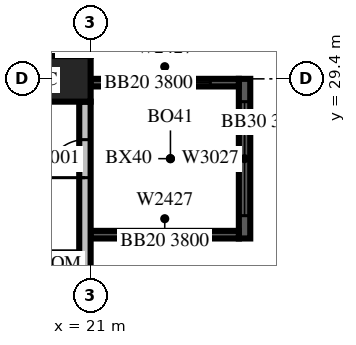
"""IFC4 building model, lengths in metres.
Left out: names, types, materials, properties, quantities, classifications, styles, units other than length and angle.
Written with IfcOpenShell. Run it as: python <this file> out.ifc"""

import sys

from ifc_helpers import new_model, si_unit, direction, frame, frame_2d, origin, origin_2d, place, context, subcontext, project, spatial, rectangle, extrude, source, transform, mapped, element, fill, save


model = new_model("IFC4")
c1 = context("Model", 3, precision=1e-05, world=origin(), true_north=direction((0.0, 1.0)))
c2 = subcontext(c1, "Body", "Model", "MODEL_VIEW")
j1 = project(units=[si_unit("LENGTHUNIT", "METRE"), si_unit("PLANEANGLEUNIT", "RADIAN")], contexts=[c1])
p1 = place(None, origin())
s1 = spatial("IfcSite", under=j1, at=p1, CompositionType="ELEMENT")
p2 = place(p1, origin())
s2 = spatial("IfcBuilding", under=s1, at=p2, CompositionType="ELEMENT")
p3 = place(p2, frame((0.0, 0.0, 65.7)))
s3 = spatial("IfcBuildingStorey", under=s2, at=p3, CompositionType="ELEMENT", Elevation=65.7)
m1 = source(origin(), c2, "Body", "SweptSolid", [
    extrude(rectangle(XDim=1.2, YDim=1.2, at=origin_2d()), origin(), (0.0, 0.0, 1.0), 4.2),
])
p4 = place(p3, frame((20.4, 29.4, 0.0), z_axis=(0.0, 0.0, 1.0), x_axis=(1.0, 0.0, 0.0)))
e1 = element("IfcColumn", 1, at=p4, inside=s3, PredefinedType="COLUMN", context=c2, shape_type="MappedRepresentation", body=[
    mapped(m1, transform((0.0, 0.0, 0.0), scale=1.0)),
])
m2 = source(origin(), c2, "Body", "SweptSolid", [
    extrude(rectangle(XDim=4.2, YDim=0.3, at=frame_2d((2.1, 0.0))), origin(), (0.0, 0.0, 1.0), 3.8),
])
p5 = place(p3, frame((25.05, 25.2, 0.0), z_axis=(0.0, 0.0, 1.0), x_axis=(0.0, 1.0, 0.0)))
e2 = element("IfcWall", 2, at=p5, inside=s3, PredefinedType="SOLIDWALL", context=c2, shape_type="MappedRepresentation", body=[
    mapped(m2, transform((0.0, 0.0, 0.0), scale=1.0)),
])
m3 = source(origin(), c2, "Body", "SweptSolid", [
    extrude(rectangle(XDim=3.0, YDim=2.7, at=frame_2d((1.5, 1.35))), frame((0.0, 0.16, 0.0), z_axis=(0.0, -1.0, 0.0), x_axis=(1.0, 0.0, 0.0)), (0.0, 0.0, 1.0), 0.32),
])
p6 = place(p5, frame((0.6, 0.0, 0.6)))
e3 = element("IfcOpeningElement", 3, at=p6, cuts=e2, PredefinedType="OPENING", context=c2, shape_type="MappedRepresentation", body=[
    mapped(m3, transform((0.0, 0.0, 0.0), scale=1.0)),
])
m4 = source(origin(), c2, "Body", "SweptSolid", [
    extrude(rectangle(XDim=3.9, YDim=0.2, at=frame_2d((1.95, 0.0))), origin(), (0.0, 0.0, 1.0), 3.8),
])
p7 = place(p3, frame((21.0, 25.3, 0.0), z_axis=(0.0, 0.0, 1.0), x_axis=(1.0, 0.0, 0.0)))
e4 = element("IfcWall", 4, at=p7, inside=s3, PredefinedType="SOLIDWALL", context=c2, shape_type="MappedRepresentation", body=[
    mapped(m4, transform((0.0, 0.0, 0.0), scale=1.0)),
])
m5 = source(origin(), c2, "Body", "SweptSolid", [
    extrude(rectangle(XDim=2.4, YDim=2.7, at=frame_2d((1.2, 1.35))), frame((0.0, 0.11, 0.0), z_axis=(0.0, -1.0, 0.0), x_axis=(1.0, 0.0, 0.0)), (0.0, 0.0, 1.0), 0.22),
])
p8 = place(p7, frame((0.75, 0.0, 0.6)))
e5 = element("IfcOpeningElement", 5, at=p8, cuts=e4, PredefinedType="OPENING", context=c2, shape_type="MappedRepresentation", body=[
    mapped(m5, transform((0.0, 0.0, 0.0), scale=1.0)),
])
p9 = place(p3, frame((21.0, 29.3, 0.0), z_axis=(0.0, 0.0, 1.0), x_axis=(1.0, 0.0, 0.0)))
e6 = element("IfcWall", 6, at=p9, inside=s3, PredefinedType="SOLIDWALL", context=c2, shape_type="MappedRepresentation", body=[
    mapped(m4, transform((0.0, 0.0, 0.0), scale=1.0)),
])
p10 = place(p9, frame((0.75, 0.0, 0.6)))
e7 = element("IfcOpeningElement", 7, at=p10, cuts=e6, PredefinedType="OPENING", context=c2, shape_type="MappedRepresentation", body=[
    mapped(m5, transform((0.0, 0.0, 0.0), scale=1.0)),
])
m6 = source(origin(), c2, "Body", "SweptSolid", [
    extrude(rectangle(XDim=6.6, YDim=0.3, at=frame_2d((3.3, 0.0))), origin(), (0.0, 0.0, 1.0), 3.8),
])
p11 = place(p3, frame((20.85, 22.2, 0.0), z_axis=(0.0, 0.0, 1.0), x_axis=(0.0, 1.0, 0.0)))
e8 = element("IfcWall", 8, at=p11, inside=s3, PredefinedType="STANDARD", context=c2, shape_type="MappedRepresentation", body=[
    mapped(m6, transform((0.0, 0.0, 0.0), scale=1.0)),
])
m7 = source(origin(), c2, "Body", "SweptSolid", [
    extrude(rectangle(XDim=1.2, YDim=2.7, at=frame_2d((0.6, 1.35))), frame((0.0, 0.16, 0.0), z_axis=(0.0, -1.0, 0.0), x_axis=(1.0, 0.0, 0.0)), (0.0, 0.0, 1.0), 0.32),
])
p12 = place(p11, frame((0.3, 0.0, 0.6)))
e9 = element("IfcOpeningElement", 9, at=p12, cuts=e8, PredefinedType="OPENING", context=c2, shape_type="MappedRepresentation", body=[
    mapped(m7, transform((0.0, 0.0, 0.0), scale=1.0)),
])
m8 = source(origin(), c2, "Body", "SweptSolid", [
    extrude(rectangle(XDim=1.0, YDim=2.1, at=frame_2d((0.5, 1.05))), frame((0.0, 0.16, 0.0), z_axis=(0.0, -1.0, 0.0), x_axis=(1.0, 0.0, 0.0)), (0.0, 0.0, 1.0), 0.32),
])
p13 = place(p11, frame((4.6, 0.0, 0.0)))
e10 = element("IfcOpeningElement", 10, at=p13, cuts=e8, PredefinedType="OPENING", context=c2, shape_type="MappedRepresentation", body=[
    mapped(m8, transform((0.0, 0.0, 0.0), scale=1.0)),
])
m9 = source(origin(), c2, "Body", "SweptSolid", [
    extrude(rectangle(XDim=7.2, YDim=0.3, at=frame_2d((3.6, 0.0))), origin(), (0.0, 0.0, 1.0), 3.8),
])
p14 = place(p3, frame((20.85, 30.0, 0.0), z_axis=(0.0, 0.0, 1.0), x_axis=(0.0, 1.0, 0.0)))
e11 = element("IfcWall", 11, at=p14, inside=s3, PredefinedType="STANDARD", context=c2, shape_type="MappedRepresentation", body=[
    mapped(m9, transform((0.0, 0.0, 0.0), scale=1.0)),
])
m10 = source(origin(), c2, "Body", "SweptSolid", [
    extrude(rectangle(XDim=2.4, YDim=2.7, at=frame_2d((1.2, 1.35))), frame((0.0, 0.16, 0.0), z_axis=(0.0, -1.0, 0.0), x_axis=(1.0, 0.0, 0.0)), (0.0, 0.0, 1.0), 0.32),
])
p15 = place(p14, frame((0.3, 0.0, 0.6)))
e12 = element("IfcOpeningElement", 12, at=p15, cuts=e11, PredefinedType="OPENING", context=c2, shape_type="MappedRepresentation", body=[
    mapped(m10, transform((0.0, 0.0, 0.0), scale=1.0)),
])
p16 = place(p14, frame((4.5, 0.0, 0.0)))
e13 = element("IfcOpeningElement", 13, at=p16, cuts=e11, PredefinedType="OPENING", context=c2, shape_type="MappedRepresentation", body=[
    mapped(m8, transform((0.0, 0.0, 0.0), scale=1.0)),
])
m11 = source(origin(), c2, "Body", "SweptSolid", [
    extrude(rectangle(XDim=3.6, YDim=0.15, at=frame_2d((1.8, 0.0))), origin(), (0.0, 0.0, 1.0), 3.8),
])
p17 = place(p3, frame((17.1, 24.8, 0.0), z_axis=(0.0, 0.0, 1.0), x_axis=(1.0, 0.0, 0.0)))
e14 = element("IfcWall", 14, at=p17, inside=s3, PredefinedType="PARTITIONING", context=c2, shape_type="MappedRepresentation", body=[
    mapped(m11, transform((0.0, 0.0, 0.0), scale=1.0)),
])
m12 = source(origin(), c2, "Body", "SweptSolid", [
    extrude(rectangle(XDim=0.9, YDim=2.1, at=frame_2d((0.45, 1.05))), frame((0.0, 0.085, 0.0), z_axis=(0.0, -1.0, 0.0), x_axis=(1.0, 0.0, 0.0)), (0.0, 0.0, 1.0), 0.17),
])
p18 = place(p17, frame((0.45, 0.0, 0.0)))
e15 = element("IfcOpeningElement", 15, at=p18, cuts=e14, PredefinedType="OPENING", context=c2, shape_type="MappedRepresentation", body=[
    mapped(m12, transform((0.0, 0.0, 0.0), scale=1.0)),
])
m13 = source(origin(), c2, "Body", "SweptSolid", [
    extrude(rectangle(XDim=3.0, YDim=2.7, at=frame_2d((1.5, 1.35))), frame((0.0, 0.03, 0.0), z_axis=(0.0, -1.0, 0.0), x_axis=(1.0, 0.0, 0.0)), (0.0, 0.0, 1.0), 0.06),
])
p19 = place(p6, origin())
e16 = element("IfcWindow", 16, at=p19, inside=s3, PartitioningType="SINGLE_PANEL", PredefinedType="WINDOW", context=c2, shape_type="MappedRepresentation", body=[
    mapped(m13, transform((0.0, 0.0, 0.0), scale=1.0)),
])
fill(e3, e16)
m14 = source(origin(), c2, "Body", "SweptSolid", [
    extrude(rectangle(XDim=2.4, YDim=2.7, at=frame_2d((1.2, 1.35))), frame((0.0, 0.03, 0.0), z_axis=(0.0, -1.0, 0.0), x_axis=(1.0, 0.0, 0.0)), (0.0, 0.0, 1.0), 0.06),
])
p20 = place(p8, origin())
e17 = element("IfcWindow", 17, at=p20, inside=s3, PartitioningType="SINGLE_PANEL", PredefinedType="WINDOW", context=c2, shape_type="MappedRepresentation", body=[
    mapped(m14, transform((0.0, 0.0, 0.0), scale=1.0)),
])
fill(e5, e17)
p21 = place(p10, origin())
e18 = element("IfcWindow", 18, at=p21, inside=s3, PartitioningType="SINGLE_PANEL", PredefinedType="WINDOW", context=c2, shape_type="MappedRepresentation", body=[
    mapped(m14, transform((0.0, 0.0, 0.0), scale=1.0)),
])
fill(e7, e18)
m15 = source(origin(), c2, "Body", "SweptSolid", [
    extrude(rectangle(XDim=1.0, YDim=2.1, at=frame_2d((0.5, 1.05))), frame((0.0, 0.025, 0.0), z_axis=(0.0, -1.0, 0.0), x_axis=(1.0, 0.0, 0.0)), (0.0, 0.0, 1.0), 0.05),
])
p22 = place(p13, origin())
e19 = element("IfcDoor", 19, at=p22, inside=s3, OperationType="SINGLE_SWING_LEFT", PredefinedType="DOOR", context=c2, shape_type="MappedRepresentation", body=[
    mapped(m15, transform((0.0, 0.0, 0.0), scale=1.0)),
])
fill(e10, e19)
save(model, sys.argv[1])
